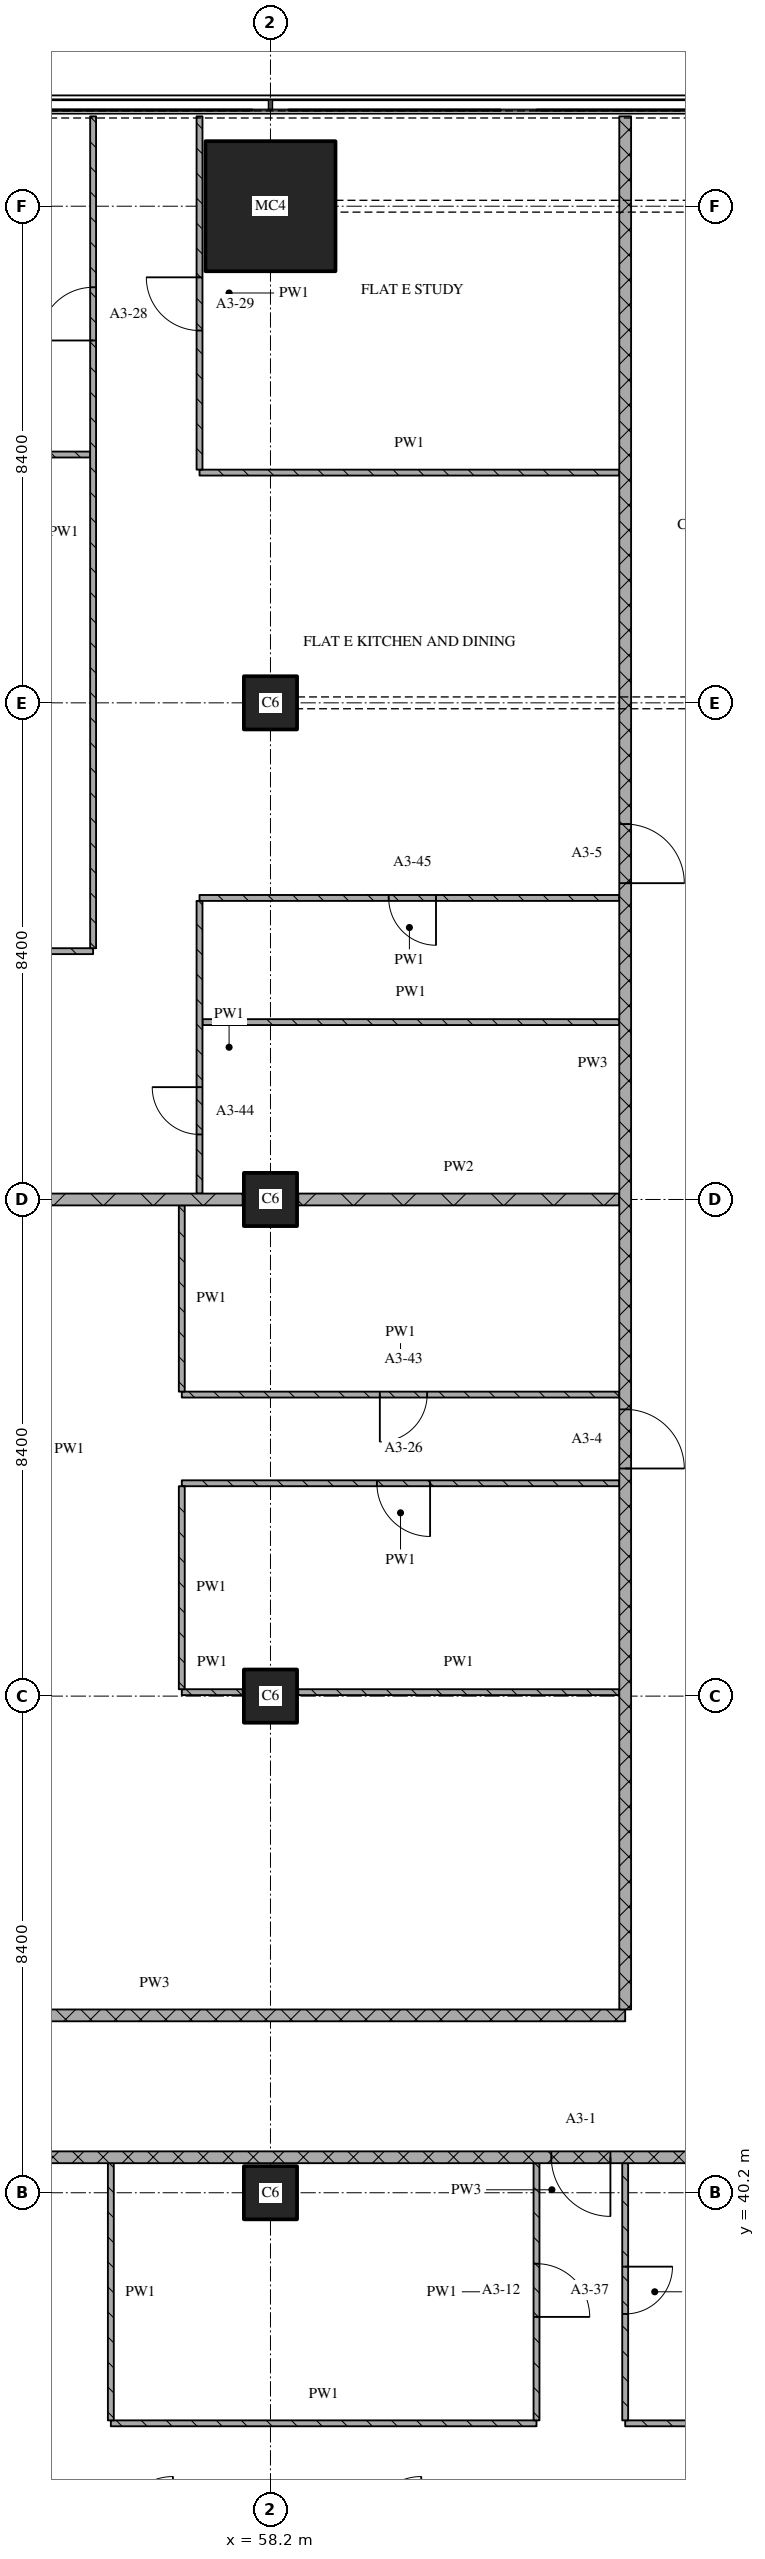
"""IFC4 building model, lengths in metres.
Left out: names, types, materials, properties, quantities, classifications, styles, units other than length and angle.
Written with IfcOpenShell. Run it as: python <this file> out.ifc"""

import sys

from ifc_helpers import new_model, si_unit, direction, frame, frame_2d, origin, origin_2d, place, context, subcontext, project, spatial, rectangle, extrude, element, fill, save


model = new_model("IFC4")
c1 = context("Model", 3, precision=1e-05, world=origin(), true_north=direction((0.0, 1.0)))
c2 = subcontext(c1, "Body", "Model", "MODEL_VIEW")
j1 = project(units=[si_unit("LENGTHUNIT", "METRE"), si_unit("PLANEANGLEUNIT", "RADIAN")], contexts=[c1])
p1 = place(None, origin())
s1 = spatial("IfcSite", under=j1, at=p1, CompositionType="ELEMENT")
p2 = place(p1, origin())
s2 = spatial("IfcBuilding", under=s1, at=p2, CompositionType="ELEMENT")
p3 = place(p2, frame((0.0, 0.0, 62.4)))
s3 = spatial("IfcBuildingStorey", under=s2, at=p3, CompositionType="ELEMENT", Elevation=62.4)
for number, where, z_axis, x_axis in (
    (1, (58.2, 40.2, 0.0), (0.0, 0.0, 1.0), (1.0, 0.0, 0.0)),
    (2, (58.2, 48.6, 0.0), (0.0, 0.0, 1.0), (1.0, 0.0, 0.0)),
    (3, (58.2, 57.0, 0.0), (0.0, 0.0, 1.0), (1.0, 0.0, 0.0)),
    (4, (58.2, 65.4, 0.0), (0.0, 0.0, 1.0), (1.0, 0.0, 0.0)),
):
    element("IfcColumn", number, at=place(p3, frame(where, z_axis=z_axis, x_axis=x_axis)), inside=s3, PredefinedType="COLUMN", context=c2, shape_type="SweptSolid", body=[
        extrude(rectangle(XDim=0.9, YDim=0.9, at=origin_2d()), origin(), (0.0, 0.0, 1.0), 3.6),
    ])
p4 = place(p3, frame((58.2, 73.8, 0.0), z_axis=(0.0, 0.0, 1.0), x_axis=(1.0, 0.0, 0.0)))
e5 = element("IfcColumn", 5, at=p4, inside=s3, PredefinedType="COLUMN", context=c2, shape_type="SweptSolid", body=[
    extrude(rectangle(XDim=2.2, YDim=2.2, at=origin_2d()), origin(), (0.0, 0.0, 1.0), 3.6),
])
p5 = place(p3, frame((55.5, 36.3, 0.0), z_axis=(0.0, 0.0, 1.0), x_axis=(1.0, 0.0, 0.0)))
e6 = element("IfcWall", 6, at=p5, inside=s3, PredefinedType="PARTITIONING", context=c2, shape_type="SweptSolid", body=[
    extrude(rectangle(XDim=7.2, YDim=0.1, at=frame_2d((3.6, 0.0))), origin(), (0.0, 0.0, 1.0), 3.32),
])
p6 = place(p3, frame((64.2, 36.3, 0.0), z_axis=(0.0, 0.0, 1.0), x_axis=(1.0, 0.0, 0.0)))
e7 = element("IfcWall", 7, at=p6, inside=s3, PredefinedType="PARTITIONING", context=c2, shape_type="SweptSolid", body=[
    extrude(rectangle(XDim=10.7, YDim=0.1, at=frame_2d((5.35, 0.0))), origin(), (0.0, 0.0, 1.0), 3.32),
])
p7 = place(p6, frame((6.35, 0.0, 0.0)))
e8 = element("IfcOpeningElement", 8, at=p7, cuts=e7, PredefinedType="OPENING", context=c2, shape_type="SweptSolid", body=[
    extrude(rectangle(XDim=0.8, YDim=2.1, at=frame_2d((0.4, 1.05))), frame((0.0, 0.06, 0.0), z_axis=(0.0, -1.0, 0.0), x_axis=(1.0, 0.0, 0.0)), (0.0, 0.0, 1.0), 0.12),
])
p8 = place(p6, frame((9.45, 0.0, 0.0)))
e9 = element("IfcOpeningElement", 9, at=p8, cuts=e7, PredefinedType="OPENING", context=c2, shape_type="SweptSolid", body=[
    extrude(rectangle(XDim=0.9, YDim=2.1, at=frame_2d((0.45, 1.05))), frame((0.0, 0.06, 0.0), z_axis=(0.0, -1.0, 0.0), x_axis=(1.0, 0.0, 0.0)), (0.0, 0.0, 1.0), 0.12),
])
p9 = place(p3, frame((75.0, 40.8, 0.0), z_axis=(0.0, 0.0, 1.0), x_axis=(-1.0, 0.0, 0.0)))
e10 = element("IfcWall", 10, at=p9, inside=s3, PredefinedType="PARTITIONING", context=c2, shape_type="SweptSolid", body=[
    extrude(rectangle(XDim=24.08, YDim=0.2, at=frame_2d((12.04, 0.0))), origin(), (0.0, 0.0, 1.0), 3.32),
])
p10 = place(p9, frame((11.05, 0.0, 0.0)))
e11 = element("IfcOpeningElement", 11, at=p10, cuts=e10, PredefinedType="OPENING", context=c2, shape_type="SweptSolid", body=[
    extrude(rectangle(XDim=1.0, YDim=2.1, at=frame_2d((0.5, 1.05))), frame((0.0, 0.11, 0.0), z_axis=(0.0, -1.0, 0.0), x_axis=(1.0, 0.0, 0.0)), (0.0, 0.0, 1.0), 0.22),
])
p11 = place(p3, frame((48.28, 43.2, 0.0), z_axis=(0.0, 0.0, 1.0), x_axis=(1.0, 0.0, 0.0)))
e12 = element("IfcWall", 12, at=p11, inside=s3, PredefinedType="PARTITIONING", context=c2, shape_type="SweptSolid", body=[
    extrude(rectangle(XDim=15.92, YDim=0.2, at=frame_2d((7.96, 0.0))), origin(), (0.0, 0.0, 1.0), 3.32),
])
p12 = place(p3, frame((56.7, 48.667, 0.0), z_axis=(0.0, 0.0, 1.0), x_axis=(1.0, 0.0, 0.0)))
e13 = element("IfcWall", 13, at=p12, inside=s3, PredefinedType="PARTITIONING", context=c2, shape_type="SweptSolid", body=[
    extrude(rectangle(XDim=1.03, YDim=0.1, at=frame_2d((0.515, 0.0))), origin(), (0.0, 0.0, 1.0), 3.32),
])
p13 = place(p3, frame((58.67, 48.667, 0.0), z_axis=(0.0, 0.0, 1.0), x_axis=(1.0, 0.0, 0.0)))
e14 = element("IfcWall", 14, at=p13, inside=s3, PredefinedType="PARTITIONING", context=c2, shape_type="SweptSolid", body=[
    extrude(rectangle(XDim=5.43, YDim=0.1, at=frame_2d((2.715, 0.0))), origin(), (0.0, 0.0, 1.0), 3.32),
])
p14 = place(p3, frame((64.1, 52.2, 0.0), z_axis=(0.0, 0.0, 1.0), x_axis=(-1.0, 0.0, 0.0)))
e15 = element("IfcWall", 15, at=p14, inside=s3, PredefinedType="PARTITIONING", context=c2, shape_type="SweptSolid", body=[
    extrude(rectangle(XDim=7.4, YDim=0.1, at=frame_2d((3.7, 0.0))), origin(), (0.0, 0.0, 1.0), 3.32),
])
p15 = place(p14, frame((3.2, 0.0, 0.0)))
e16 = element("IfcOpeningElement", 16, at=p15, cuts=e15, PredefinedType="OPENING", context=c2, shape_type="SweptSolid", body=[
    extrude(rectangle(XDim=0.9, YDim=2.1, at=frame_2d((0.45, 1.05))), frame((0.0, 0.06, 0.0), z_axis=(0.0, -1.0, 0.0), x_axis=(1.0, 0.0, 0.0)), (0.0, 0.0, 1.0), 0.12),
])
p16 = place(p3, frame((56.7, 53.7, 0.0), z_axis=(0.0, 0.0, 1.0), x_axis=(1.0, 0.0, 0.0)))
e17 = element("IfcWall", 17, at=p16, inside=s3, PredefinedType="PARTITIONING", context=c2, shape_type="SweptSolid", body=[
    extrude(rectangle(XDim=7.4, YDim=0.1, at=frame_2d((3.7, 0.0))), origin(), (0.0, 0.0, 1.0), 3.32),
])
p17 = place(p16, frame((3.35, 0.0, 0.0)))
e18 = element("IfcOpeningElement", 18, at=p17, cuts=e17, PredefinedType="OPENING", context=c2, shape_type="SweptSolid", body=[
    extrude(rectangle(XDim=0.8, YDim=2.1, at=frame_2d((0.4, 1.05))), frame((0.0, 0.06, 0.0), z_axis=(0.0, -1.0, 0.0), x_axis=(1.0, 0.0, 0.0)), (0.0, 0.0, 1.0), 0.12),
])
p18 = place(p3, frame((50.27, 57.0, 0.0), z_axis=(0.0, 0.0, 1.0), x_axis=(1.0, 0.0, 0.0)))
e19 = element("IfcWall", 19, at=p18, inside=s3, PredefinedType="PARTITIONING", context=c2, shape_type="SweptSolid", body=[
    extrude(rectangle(XDim=7.46, YDim=0.2, at=frame_2d((3.73, 0.0))), origin(), (0.0, 0.0, 1.0), 3.32),
])
p19 = place(p3, frame((58.67, 57.0, 0.0), z_axis=(0.0, 0.0, 1.0), x_axis=(1.0, 0.0, 0.0)))
e20 = element("IfcWall", 20, at=p19, inside=s3, PredefinedType="PARTITIONING", context=c2, shape_type="SweptSolid", body=[
    extrude(rectangle(XDim=5.43, YDim=0.2, at=frame_2d((2.715, 0.0))), origin(), (0.0, 0.0, 1.0), 3.32),
])
p20 = place(p3, frame((57.05, 60.0, 0.0), z_axis=(0.0, 0.0, 1.0), x_axis=(1.0, 0.0, 0.0)))
e21 = element("IfcWall", 21, at=p20, inside=s3, PredefinedType="PARTITIONING", context=c2, shape_type="SweptSolid", body=[
    extrude(rectangle(XDim=7.05, YDim=0.1, at=frame_2d((3.525, 0.0))), origin(), (0.0, 0.0, 1.0), 3.32),
])
p21 = place(p3, frame((48.28, 61.2, 0.0), z_axis=(0.0, 0.0, 1.0), x_axis=(1.0, 0.0, 0.0)))
e22 = element("IfcWall", 22, at=p21, inside=s3, PredefinedType="PARTITIONING", context=c2, shape_type="SweptSolid", body=[
    extrude(rectangle(XDim=6.92, YDim=0.1, at=frame_2d((3.46, 0.0))), origin(), (0.0, 0.0, 1.0), 3.32),
])
p22 = place(p21, frame((2.87, 0.0, 0.0)))
e23 = element("IfcOpeningElement", 23, at=p22, cuts=e22, PredefinedType="OPENING", context=c2, shape_type="SweptSolid", body=[
    extrude(rectangle(XDim=0.9, YDim=2.1, at=frame_2d((0.45, 1.05))), frame((0.0, 0.06, 0.0), z_axis=(0.0, -1.0, 0.0), x_axis=(1.0, 0.0, 0.0)), (0.0, 0.0, 1.0), 0.12),
])
p23 = place(p3, frame((64.1, 62.1, 0.0), z_axis=(0.0, 0.0, 1.0), x_axis=(-1.0, 0.0, 0.0)))
e24 = element("IfcWall", 24, at=p23, inside=s3, PredefinedType="PARTITIONING", context=c2, shape_type="SweptSolid", body=[
    extrude(rectangle(XDim=7.1, YDim=0.1, at=frame_2d((3.55, 0.0))), origin(), (0.0, 0.0, 1.0), 3.32),
])
p24 = place(p23, frame((3.1, 0.0, 0.0)))
e25 = element("IfcOpeningElement", 25, at=p24, cuts=e24, PredefinedType="OPENING", context=c2, shape_type="SweptSolid", body=[
    extrude(rectangle(XDim=0.8, YDim=2.1, at=frame_2d((0.4, 1.05))), frame((0.0, 0.06, 0.0), z_axis=(0.0, -1.0, 0.0), x_axis=(1.0, 0.0, 0.0)), (0.0, 0.0, 1.0), 0.12),
])
p25 = place(p3, frame((57.0, 69.294, 0.0), z_axis=(0.0, 0.0, 1.0), x_axis=(1.0, 0.0, 0.0)))
e26 = element("IfcWall", 26, at=p25, inside=s3, PredefinedType="PARTITIONING", context=c2, shape_type="SweptSolid", body=[
    extrude(rectangle(XDim=7.1, YDim=0.1, at=frame_2d((3.55, 0.0))), origin(), (0.0, 0.0, 1.0), 3.32),
])
p26 = place(p3, frame((48.28, 69.6, 0.0), z_axis=(0.0, 0.0, 1.0), x_axis=(1.0, 0.0, 0.0)))
e27 = element("IfcWall", 27, at=p26, inside=s3, PredefinedType="PARTITIONING", context=c2, shape_type="SweptSolid", body=[
    extrude(rectangle(XDim=6.87, YDim=0.1, at=frame_2d((3.435, 0.0))), origin(), (0.0, 0.0, 1.0), 3.32),
])
p27 = place(p3, frame((55.2, 61.25, 0.0), z_axis=(0.0, 0.0, 1.0), x_axis=(0.0, 1.0, 0.0)))
e28 = element("IfcWall", 28, at=p27, inside=s3, PredefinedType="PARTITIONING", context=c2, shape_type="SweptSolid", body=[
    extrude(rectangle(XDim=14.07, YDim=0.1, at=frame_2d((7.035, 0.0))), origin(), (0.0, 0.0, 1.0), 3.32),
])
p28 = place(p27, frame((10.279, 0.0, 0.0)))
e29 = element("IfcOpeningElement", 29, at=p28, cuts=e28, PredefinedType="OPENING", context=c2, shape_type="SweptSolid", body=[
    extrude(rectangle(XDim=0.9, YDim=2.1, at=frame_2d((0.45, 1.05))), frame((0.0, 0.06, 0.0), z_axis=(0.0, -1.0, 0.0), x_axis=(1.0, 0.0, 0.0)), (0.0, 0.0, 1.0), 0.12),
])
p29 = place(p3, frame((55.5, 40.7, 0.0), z_axis=(0.0, 0.0, 1.0), x_axis=(0.0, -1.0, 0.0)))
e30 = element("IfcWall", 30, at=p29, inside=s3, PredefinedType="PARTITIONING", context=c2, shape_type="SweptSolid", body=[
    extrude(rectangle(XDim=4.35, YDim=0.1, at=frame_2d((2.175, 0.0))), origin(), (0.0, 0.0, 1.0), 3.32),
])
p30 = place(p3, frame((56.7, 52.15, 0.0), z_axis=(0.0, 0.0, 1.0), x_axis=(0.0, -1.0, 0.0)))
e31 = element("IfcWall", 31, at=p30, inside=s3, PredefinedType="PARTITIONING", context=c2, shape_type="SweptSolid", body=[
    extrude(rectangle(XDim=3.433, YDim=0.1, at=frame_2d((1.717, 0.0))), origin(), (0.0, 0.0, 1.0), 3.32),
])
p31 = place(p3, frame((56.7, 56.9, 0.0), z_axis=(0.0, 0.0, 1.0), x_axis=(0.0, -1.0, 0.0)))
e32 = element("IfcWall", 32, at=p31, inside=s3, PredefinedType="PARTITIONING", context=c2, shape_type="SweptSolid", body=[
    extrude(rectangle(XDim=3.15, YDim=0.1, at=frame_2d((1.575, 0.0))), origin(), (0.0, 0.0, 1.0), 3.32),
])
p32 = place(p3, frame((57.0, 62.05, 0.0), z_axis=(0.0, 0.0, 1.0), x_axis=(0.0, -1.0, 0.0)))
e33 = element("IfcWall", 33, at=p32, inside=s3, PredefinedType="PARTITIONING", context=c2, shape_type="SweptSolid", body=[
    extrude(rectangle(XDim=4.95, YDim=0.1, at=frame_2d((2.475, 0.0))), origin(), (0.0, 0.0, 1.0), 3.32),
])
p33 = place(p32, frame((3.15, 0.0, 0.0)))
e34 = element("IfcOpeningElement", 34, at=p33, cuts=e33, PredefinedType="OPENING", context=c2, shape_type="SweptSolid", body=[
    extrude(rectangle(XDim=0.8, YDim=2.1, at=frame_2d((0.4, 1.05))), frame((0.0, 0.06, 0.0), z_axis=(0.0, -1.0, 0.0), x_axis=(1.0, 0.0, 0.0)), (0.0, 0.0, 1.0), 0.12),
])
p34 = place(p3, frame((57.0, 75.32, 0.0), z_axis=(0.0, 0.0, 1.0), x_axis=(0.0, -1.0, 0.0)))
e35 = element("IfcWall", 35, at=p34, inside=s3, PredefinedType="PARTITIONING", context=c2, shape_type="SweptSolid", body=[
    extrude(rectangle(XDim=5.976, YDim=0.1, at=frame_2d((2.988, 0.0))), origin(), (0.0, 0.0, 1.0), 3.32),
])
p35 = place(p34, frame((2.723, 0.0, 0.0)))
e36 = element("IfcOpeningElement", 36, at=p35, cuts=e35, PredefinedType="OPENING", context=c2, shape_type="SweptSolid", body=[
    extrude(rectangle(XDim=0.9, YDim=2.1, at=frame_2d((0.45, 1.05))), frame((0.0, 0.06, 0.0), z_axis=(0.0, -1.0, 0.0), x_axis=(1.0, 0.0, 0.0)), (0.0, 0.0, 1.0), 0.12),
])
p36 = place(p3, frame((62.7, 36.35, 0.0), z_axis=(0.0, 0.0, 1.0), x_axis=(0.0, 1.0, 0.0)))
e37 = element("IfcWall", 37, at=p36, inside=s3, PredefinedType="PARTITIONING", context=c2, shape_type="SweptSolid", body=[
    extrude(rectangle(XDim=4.35, YDim=0.1, at=frame_2d((2.175, 0.0))), origin(), (0.0, 0.0, 1.0), 3.32),
])
p37 = place(p36, frame((1.75, 0.0, 0.0)))
e38 = element("IfcOpeningElement", 38, at=p37, cuts=e37, PredefinedType="OPENING", context=c2, shape_type="SweptSolid", body=[
    extrude(rectangle(XDim=0.9, YDim=2.1, at=frame_2d((0.45, 1.05))), frame((0.0, 0.06, 0.0), z_axis=(0.0, -1.0, 0.0), x_axis=(1.0, 0.0, 0.0)), (0.0, 0.0, 1.0), 0.12),
])
p38 = place(p3, frame((64.2, 43.3, 0.0), z_axis=(0.0, 0.0, 1.0), x_axis=(0.0, 1.0, 0.0)))
e39 = element("IfcWall", 39, at=p38, inside=s3, PredefinedType="PARTITIONING", context=c2, shape_type="SweptSolid", body=[
    extrude(rectangle(XDim=32.02, YDim=0.2, at=frame_2d((16.01, 0.0))), origin(), (0.0, 0.0, 1.0), 3.32),
])
p39 = place(p38, frame((9.15, 0.0, 0.0)))
e40 = element("IfcOpeningElement", 40, at=p39, cuts=e39, PredefinedType="OPENING", context=c2, shape_type="SweptSolid", body=[
    extrude(rectangle(XDim=1.0, YDim=2.1, at=frame_2d((0.5, 1.05))), frame((0.0, 0.11, 0.0), z_axis=(0.0, -1.0, 0.0), x_axis=(1.0, 0.0, 0.0)), (0.0, 0.0, 1.0), 0.22),
])
p40 = place(p38, frame((19.05, 0.0, 0.0)))
e41 = element("IfcOpeningElement", 41, at=p40, cuts=e39, PredefinedType="OPENING", context=c2, shape_type="SweptSolid", body=[
    extrude(rectangle(XDim=1.0, YDim=2.1, at=frame_2d((0.5, 1.05))), frame((0.0, 0.11, 0.0), z_axis=(0.0, -1.0, 0.0), x_axis=(1.0, 0.0, 0.0)), (0.0, 0.0, 1.0), 0.22),
])
p41 = place(p3, frame((64.2, 40.7, 0.0), z_axis=(0.0, 0.0, 1.0), x_axis=(0.0, -1.0, 0.0)))
e42 = element("IfcWall", 42, at=p41, inside=s3, PredefinedType="PARTITIONING", context=c2, shape_type="SweptSolid", body=[
    extrude(rectangle(XDim=4.35, YDim=0.1, at=frame_2d((2.175, 0.0))), origin(), (0.0, 0.0, 1.0), 3.32),
])
p42 = place(p41, frame((1.75, 0.0, 0.0)))
e43 = element("IfcOpeningElement", 43, at=p42, cuts=e42, PredefinedType="OPENING", context=c2, shape_type="SweptSolid", body=[
    extrude(rectangle(XDim=0.8, YDim=2.1, at=frame_2d((0.4, 1.05))), frame((0.0, 0.06, 0.0), z_axis=(0.0, -1.0, 0.0), x_axis=(1.0, 0.0, 0.0)), (0.0, 0.0, 1.0), 0.12),
])
p43 = place(p10, origin())
e44 = element("IfcDoor", 44, at=p43, inside=s3, OperationType="SINGLE_SWING_LEFT", PredefinedType="DOOR", context=c2, shape_type="SweptSolid", body=[
    extrude(rectangle(XDim=1.0, YDim=2.1, at=frame_2d((0.5, 1.05))), frame((0.0, 0.025, 0.0), z_axis=(0.0, -1.0, 0.0), x_axis=(1.0, 0.0, 0.0)), (0.0, 0.0, 1.0), 0.05),
])
fill(e11, e44)
p44 = place(p15, origin())
e45 = element("IfcDoor", 45, at=p44, inside=s3, OperationType="SINGLE_SWING_LEFT", PredefinedType="DOOR", context=c2, shape_type="SweptSolid", body=[
    extrude(rectangle(XDim=0.9, YDim=2.1, at=frame_2d((0.45, 1.05))), frame((0.0, 0.025, 0.0), z_axis=(0.0, -1.0, 0.0), x_axis=(1.0, 0.0, 0.0)), (0.0, 0.0, 1.0), 0.05),
])
fill(e16, e45)
p45 = place(p17, origin())
e46 = element("IfcDoor", 46, at=p45, inside=s3, OperationType="SINGLE_SWING_RIGHT", PredefinedType="DOOR", context=c2, shape_type="SweptSolid", body=[
    extrude(rectangle(XDim=0.8, YDim=2.1, at=frame_2d((0.4, 1.05))), frame((0.0, 0.025, 0.0), z_axis=(0.0, -1.0, 0.0), x_axis=(1.0, 0.0, 0.0)), (0.0, 0.0, 1.0), 0.05),
])
fill(e18, e46)
p46 = place(p24, origin())
e47 = element("IfcDoor", 47, at=p46, inside=s3, OperationType="SINGLE_SWING_LEFT", PredefinedType="DOOR", context=c2, shape_type="SweptSolid", body=[
    extrude(rectangle(XDim=0.8, YDim=2.1, at=frame_2d((0.4, 1.05))), frame((0.0, 0.025, 0.0), z_axis=(0.0, -1.0, 0.0), x_axis=(1.0, 0.0, 0.0)), (0.0, 0.0, 1.0), 0.05),
])
fill(e25, e47)
p47 = place(p28, origin())
e48 = element("IfcDoor", 48, at=p47, inside=s3, OperationType="SINGLE_SWING_LEFT", PredefinedType="DOOR", context=c2, shape_type="SweptSolid", body=[
    extrude(rectangle(XDim=0.9, YDim=2.1, at=frame_2d((0.45, 1.05))), frame((0.0, 0.025, 0.0), z_axis=(0.0, -1.0, 0.0), x_axis=(1.0, 0.0, 0.0)), (0.0, 0.0, 1.0), 0.05),
])
fill(e29, e48)
p48 = place(p33, origin())
e49 = element("IfcDoor", 49, at=p48, inside=s3, OperationType="SINGLE_SWING_RIGHT", PredefinedType="DOOR", context=c2, shape_type="SweptSolid", body=[
    extrude(rectangle(XDim=0.8, YDim=2.1, at=frame_2d((0.4, 1.05))), frame((0.0, 0.025, 0.0), z_axis=(0.0, -1.0, 0.0), x_axis=(1.0, 0.0, 0.0)), (0.0, 0.0, 1.0), 0.05),
])
fill(e34, e49)
p49 = place(p35, origin())
e50 = element("IfcDoor", 50, at=p49, inside=s3, OperationType="SINGLE_SWING_RIGHT", PredefinedType="DOOR", context=c2, shape_type="SweptSolid", body=[
    extrude(rectangle(XDim=0.9, YDim=2.1, at=frame_2d((0.45, 1.05))), frame((0.0, 0.025, 0.0), z_axis=(0.0, -1.0, 0.0), x_axis=(1.0, 0.0, 0.0)), (0.0, 0.0, 1.0), 0.05),
])
fill(e36, e50)
p50 = place(p37, origin())
e51 = element("IfcDoor", 51, at=p50, inside=s3, OperationType="SINGLE_SWING_RIGHT", PredefinedType="DOOR", context=c2, shape_type="SweptSolid", body=[
    extrude(rectangle(XDim=0.9, YDim=2.1, at=frame_2d((0.45, 1.05))), frame((0.0, 0.025, 0.0), z_axis=(0.0, -1.0, 0.0), x_axis=(1.0, 0.0, 0.0)), (0.0, 0.0, 1.0), 0.05),
])
fill(e38, e51)
p51 = place(p39, origin())
e52 = element("IfcDoor", 52, at=p51, inside=s3, OperationType="SINGLE_SWING_RIGHT", PredefinedType="DOOR", context=c2, shape_type="SweptSolid", body=[
    extrude(rectangle(XDim=1.0, YDim=2.1, at=frame_2d((0.5, 1.05))), frame((0.0, 0.025, 0.0), z_axis=(0.0, -1.0, 0.0), x_axis=(1.0, 0.0, 0.0)), (0.0, 0.0, 1.0), 0.05),
])
fill(e40, e52)
p52 = place(p40, origin())
e53 = element("IfcDoor", 53, at=p52, inside=s3, OperationType="SINGLE_SWING_RIGHT", PredefinedType="DOOR", context=c2, shape_type="SweptSolid", body=[
    extrude(rectangle(XDim=1.0, YDim=2.1, at=frame_2d((0.5, 1.05))), frame((0.0, 0.025, 0.0), z_axis=(0.0, -1.0, 0.0), x_axis=(1.0, 0.0, 0.0)), (0.0, 0.0, 1.0), 0.05),
])
fill(e41, e53)
p53 = place(p42, origin())
e54 = element("IfcDoor", 54, at=p53, inside=s3, OperationType="SINGLE_SWING_LEFT", PredefinedType="DOOR", context=c2, shape_type="SweptSolid", body=[
    extrude(rectangle(XDim=0.8, YDim=2.1, at=frame_2d((0.4, 1.05))), frame((0.0, 0.025, 0.0), z_axis=(0.0, -1.0, 0.0), x_axis=(1.0, 0.0, 0.0)), (0.0, 0.0, 1.0), 0.05),
])
fill(e43, e54)
save(model, sys.argv[1])
